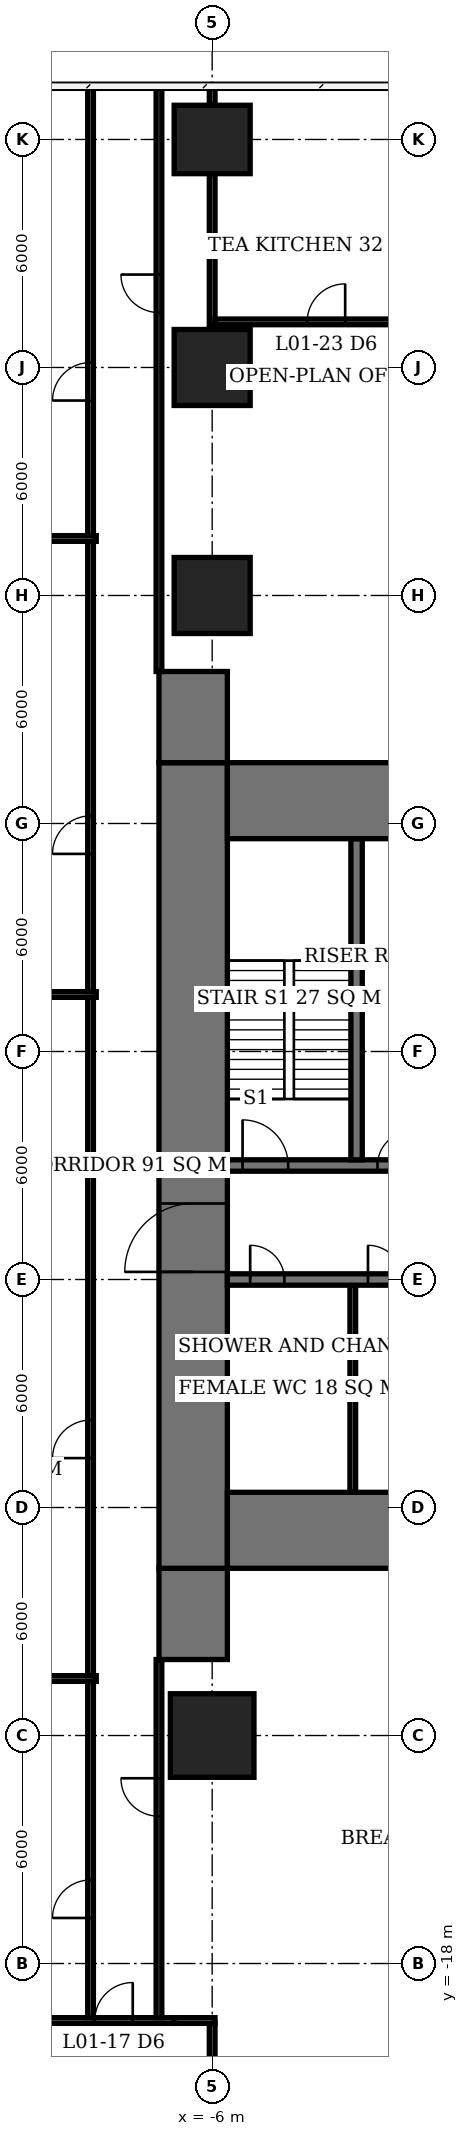
"""IFC4 building model, lengths in metres.
Left out: names, types, materials, properties, quantities, classifications, styles, units other than length and angle.
Written with IfcOpenShell. Run it as: python <this file> out.ifc"""

import sys

from ifc_helpers import new_model, si_unit, direction, frame, frame_2d, origin, origin_2d, place, context, subcontext, project, spatial, rectangle, extrude, element, fill, save


model = new_model("IFC4")
c1 = context("Model", 3, precision=1e-05, world=origin(), true_north=direction((0.0, 1.0)))
c2 = subcontext(c1, "Body", "Model", "MODEL_VIEW")
j1 = project(units=[si_unit("LENGTHUNIT", "METRE"), si_unit("PLANEANGLEUNIT", "RADIAN")], contexts=[c1])
p1 = place(None, origin())
s1 = spatial("IfcSite", under=j1, at=p1, CompositionType="ELEMENT")
p2 = place(p1, origin())
s2 = spatial("IfcBuilding", under=s1, at=p2, CompositionType="ELEMENT")
p3 = place(p2, frame((0.0, 0.0, 6.0)))
s3 = spatial("IfcBuildingStorey", under=s2, at=p3, CompositionType="ELEMENT", Elevation=6.0)
p4 = place(p3, frame((-6.0, -12.0, 0.0), z_axis=(0.0, 0.0, 1.0), x_axis=(1.0, 0.0, 0.0)))
e1 = element("IfcColumn", 1, at=p4, inside=s3, PredefinedType="COLUMN", context=c2, shape_type="SweptSolid", body=[
    extrude(rectangle(XDim=2.2, YDim=2.2, at=origin_2d()), origin(), (0.0, 0.0, 1.0), 5.0),
])
for number, where, z_axis, x_axis in (
    (2, (-6.0, 18.0, 0.0), (0.0, 0.0, 1.0), (1.0, 0.0, 0.0)),
    (3, (-6.0, 24.0, 0.0), (0.0, 0.0, 1.0), (1.0, 0.0, 0.0)),
):
    element("IfcColumn", number, at=place(p3, frame(where, z_axis=z_axis, x_axis=x_axis)), inside=s3, PredefinedType="COLUMN", context=c2, shape_type="SweptSolid", body=[
        extrude(rectangle(XDim=2.0, YDim=2.0, at=origin_2d()), origin(), (0.0, 0.0, 1.0), 5.0),
    ])
p5 = place(p3, frame((-6.0, 30.0, 0.0), z_axis=(0.0, 0.0, 1.0), x_axis=(1.0, 0.0, 0.0)))
e4 = element("IfcColumn", 4, at=p5, inside=s3, PredefinedType="COLUMN", context=c2, shape_type="SweptSolid", body=[
    extrude(rectangle(XDim=2.0, YDim=1.8, at=origin_2d()), origin(), (0.0, 0.0, 1.0), 5.0),
])
for number, where, z_axis, x_axis in (
    (5, (-5.6, -6.6, 0.0), (0.0, 0.0, 1.0), (1.0, 0.0, 0.0)),
    (6, (-5.6, 12.6, 0.0), (0.0, 0.0, 1.0), (1.0, 0.0, 0.0)),
):
    element("IfcWall", number, at=place(p3, frame(where, z_axis=z_axis, x_axis=x_axis)), inside=s3, PredefinedType="SHEAR", context=c2, shape_type="SweptSolid", body=[
        extrude(rectangle(XDim=23.2, YDim=2.0, at=frame_2d((11.6, 0.0))), origin(), (0.0, 0.0, 1.0), 5.0),
    ])
p6 = place(p3, frame((-6.5, -7.6, 0.0), z_axis=(0.0, 0.0, 1.0), x_axis=(0.0, 1.0, 0.0)))
e7 = element("IfcWall", 7, at=p6, inside=s3, PredefinedType="SHEAR", context=c2, shape_type="SweptSolid", body=[
    extrude(rectangle(XDim=21.2, YDim=1.8, at=frame_2d((10.6, 0.0))), origin(), (0.0, 0.0, 1.0), 5.0),
])
p7 = place(p6, frame((7.8, 0.0, 0.0)))
e8 = element("IfcOpeningElement", 8, at=p7, cuts=e7, PredefinedType="OPENING", context=c2, shape_type="SweptSolid", body=[
    extrude(rectangle(XDim=1.8, YDim=2.4, at=frame_2d((0.9, 1.2))), frame((0.0, 0.91, 0.0), z_axis=(0.0, -1.0, 0.0), x_axis=(1.0, 0.0, 0.0)), (0.0, 0.0, 1.0), 1.82),
])
for number, where, z_axis, x_axis in (
    (9, (-6.5, -10.0, 0.0), (0.0, 0.0, 1.0), (0.0, 1.0, 0.0)),
    (10, (-6.5, 13.6, 0.0), (0.0, 0.0, 1.0), (0.0, 1.0, 0.0)),
):
    element("IfcWall", number, at=place(p3, frame(where, z_axis=z_axis, x_axis=x_axis)), inside=s3, PredefinedType="SHEAR", context=c2, shape_type="SweptSolid", body=[
        extrude(rectangle(XDim=2.4, YDim=1.8, at=frame_2d((1.2, 0.0))), origin(), (0.0, 0.0, 1.0), 5.0),
    ])
p8 = place(p3, frame((-5.6, 0.0, 0.0), z_axis=(0.0, 0.0, 1.0), x_axis=(1.0, 0.0, 0.0)))
e11 = element("IfcWall", 11, at=p8, inside=s3, PredefinedType="SHEAR", context=c2, shape_type="SweptSolid", body=[
    extrude(rectangle(XDim=17.75, YDim=0.3, at=frame_2d((8.875, 0.0))), origin(), (0.0, 0.0, 1.0), 5.0),
])
p9 = place(p8, frame((0.6, 0.0, 0.0)))
e12 = element("IfcOpeningElement", 12, at=p9, cuts=e11, PredefinedType="OPENING", context=c2, shape_type="SweptSolid", body=[
    extrude(rectangle(XDim=0.9, YDim=2.1, at=frame_2d((0.45, 1.05))), frame((0.0, 0.16, 0.0), z_axis=(0.0, -1.0, 0.0), x_axis=(1.0, 0.0, 0.0)), (0.0, 0.0, 1.0), 0.32),
])
p10 = place(p8, frame((3.7, 0.0, 0.0)))
e13 = element("IfcOpeningElement", 13, at=p10, cuts=e11, PredefinedType="OPENING", context=c2, shape_type="SweptSolid", body=[
    extrude(rectangle(XDim=0.9, YDim=2.1, at=frame_2d((0.45, 1.05))), frame((0.0, 0.16, 0.0), z_axis=(0.0, -1.0, 0.0), x_axis=(1.0, 0.0, 0.0)), (0.0, 0.0, 1.0), 0.32),
])
p11 = place(p3, frame((-5.6, 3.0, 0.0), z_axis=(0.0, 0.0, 1.0), x_axis=(1.0, 0.0, 0.0)))
e14 = element("IfcWall", 14, at=p11, inside=s3, PredefinedType="SHEAR", context=c2, shape_type="SweptSolid", body=[
    extrude(rectangle(XDim=5.45, YDim=0.3, at=frame_2d((2.725, 0.0))), origin(), (0.0, 0.0, 1.0), 5.0),
])
p12 = place(p11, frame((0.4, 0.0, 0.0)))
e15 = element("IfcOpeningElement", 15, at=p12, cuts=e14, PredefinedType="OPENING", context=c2, shape_type="SweptSolid", body=[
    extrude(rectangle(XDim=1.2, YDim=2.1, at=frame_2d((0.6, 1.05))), frame((0.0, 0.16, 0.0), z_axis=(0.0, -1.0, 0.0), x_axis=(1.0, 0.0, 0.0)), (0.0, 0.0, 1.0), 0.32),
])
p13 = place(p11, frame((3.95, 0.0, 0.0)))
e16 = element("IfcOpeningElement", 16, at=p13, cuts=e14, PredefinedType="OPENING", context=c2, shape_type="SweptSolid", body=[
    extrude(rectangle(XDim=0.9, YDim=2.1, at=frame_2d((0.45, 1.05))), frame((0.0, 0.16, 0.0), z_axis=(0.0, -1.0, 0.0), x_axis=(1.0, 0.0, 0.0)), (0.0, 0.0, 1.0), 0.32),
])
p14 = place(p3, frame((-2.2, 3.15, 0.0), z_axis=(0.0, 0.0, 1.0), x_axis=(0.0, 1.0, 0.0)))
e17 = element("IfcWall", 17, at=p14, inside=s3, PredefinedType="SHEAR", context=c2, shape_type="SweptSolid", body=[
    extrude(rectangle(XDim=8.45, YDim=0.3, at=frame_2d((4.225, 0.0))), origin(), (0.0, 0.0, 1.0), 5.0),
])
p15 = place(p3, frame((-2.3, -5.6, 0.0), z_axis=(0.0, 0.0, 1.0), x_axis=(0.0, 1.0, 0.0)))
e18 = element("IfcWall", 18, at=p15, inside=s3, PredefinedType="PLUMBINGWALL", context=c2, shape_type="SweptSolid", body=[
    extrude(rectangle(XDim=5.45, YDim=0.15, at=frame_2d((2.725, 0.0))), origin(), (0.0, 0.0, 1.0), 4.75),
])
p16 = place(p3, frame((-10.99, -19.5, 0.0), z_axis=(0.0, 0.0, 1.0), x_axis=(1.0, 0.0, 0.0)))
e19 = element("IfcWall", 19, at=p16, inside=s3, PredefinedType="PARTITIONING", context=c2, shape_type="SweptSolid", body=[
    extrude(rectangle(XDim=3.98, YDim=0.15, at=frame_2d((1.99, 0.0))), origin(), (0.0, 0.0, 1.0), 4.75),
])
p17 = place(p16, frame((1.9, 0.0, 0.0)))
e20 = element("IfcOpeningElement", 20, at=p17, cuts=e19, PredefinedType="OPENING", context=c2, shape_type="SweptSolid", body=[
    extrude(rectangle(XDim=1.0, YDim=2.1, at=frame_2d((0.5, 1.05))), frame((0.0, 0.085, 0.0), z_axis=(0.0, -1.0, 0.0), x_axis=(1.0, 0.0, 0.0)), (0.0, 0.0, 1.0), 0.17),
])
p18 = place(p3, frame((-7.01, -19.5, 0.0), z_axis=(0.0, 0.0, 1.0), x_axis=(1.0, 0.0, 0.0)))
e21 = element("IfcWall", 21, at=p18, inside=s3, PredefinedType="PARTITIONING", context=c2, shape_type="SweptSolid", body=[
    extrude(rectangle(XDim=1.085, YDim=0.15, at=frame_2d((0.542, 0.0))), origin(), (0.0, 0.0, 1.0), 3.75),
])
p19 = place(p3, frame((-5.925, 25.2, 0.0), z_axis=(0.0, 0.0, 1.0), x_axis=(1.0, 0.0, 0.0)))
e22 = element("IfcWall", 22, at=p19, inside=s3, PredefinedType="PARTITIONING", context=c2, shape_type="SweptSolid", body=[
    extrude(rectangle(XDim=5.85, YDim=0.15, at=frame_2d((2.925, 0.0))), origin(), (0.0, 0.0, 1.0), 4.75),
])
p20 = place(p19, frame((2.425, 0.0, 0.0)))
e23 = element("IfcOpeningElement", 23, at=p20, cuts=e22, PredefinedType="OPENING", context=c2, shape_type="SweptSolid", body=[
    extrude(rectangle(XDim=1.0, YDim=2.1, at=frame_2d((0.5, 1.05))), frame((0.0, 0.085, 0.0), z_axis=(0.0, -1.0, 0.0), x_axis=(1.0, 0.0, 0.0)), (0.0, 0.0, 1.0), 0.17),
])
p21 = place(p3, frame((-6.0, -23.1, 0.0), z_axis=(0.0, 0.0, 1.0), x_axis=(0.0, 1.0, 0.0)))
e24 = element("IfcWall", 24, at=p21, inside=s3, PredefinedType="PARTITIONING", context=c2, shape_type="SweptSolid", body=[
    extrude(rectangle(XDim=3.525, YDim=0.15, at=frame_2d((1.763, 0.0))), origin(), (0.0, 0.0, 1.0), 3.75),
])
p22 = place(p3, frame((-6.0, 25.125, 0.0), z_axis=(0.0, 0.0, 1.0), x_axis=(0.0, 1.0, 0.0)))
e25 = element("IfcWall", 25, at=p22, inside=s3, PredefinedType="PARTITIONING", context=c2, shape_type="SweptSolid", body=[
    extrude(rectangle(XDim=3.975, YDim=0.15, at=frame_2d((1.988, 0.0))), origin(), (0.0, 0.0, 1.0), 4.75),
])
p23 = place(p3, frame((-6.0, 30.9, 0.0), z_axis=(0.0, 0.0, 1.0), x_axis=(0.0, 1.0, 0.0)))
e26 = element("IfcWall", 26, at=p23, inside=s3, PredefinedType="PARTITIONING", context=c2, shape_type="SweptSolid", body=[
    extrude(rectangle(XDim=0.475, YDim=0.15, at=frame_2d((0.238, 0.0))), origin(), (0.0, 0.0, 1.0), 4.75),
])
for number, where, z_axis, x_axis in (
    (27, (-31.375, 7.5, 0.0), (0.0, 0.0, 1.0), (1.0, 0.0, 0.0)),
    (28, (-31.375, 19.5, 0.0), (0.0, 0.0, 1.0), (1.0, 0.0, 0.0)),
):
    element("IfcWall", number, at=place(p3, frame(where, z_axis=z_axis, x_axis=x_axis)), inside=s3, PredefinedType="PARTITIONING", context=c2, shape_type="SweptSolid", body=[
        extrude(rectangle(XDim=22.325, YDim=0.15, at=frame_2d((11.163, 0.0))), origin(), (0.0, 0.0, 1.0), 4.75),
    ])
p24 = place(p3, frame((-19.075, -10.5, 0.0), z_axis=(0.0, 0.0, 1.0), x_axis=(1.0, 0.0, 0.0)))
e29 = element("IfcWall", 29, at=p24, inside=s3, PredefinedType="PARTITIONING", context=c2, shape_type="SweptSolid", body=[
    extrude(rectangle(XDim=10.025, YDim=0.15, at=frame_2d((5.012, 0.0))), origin(), (0.0, 0.0, 1.0), 4.75),
])
p25 = place(p3, frame((-9.2, -19.425, 0.0), z_axis=(0.0, 0.0, 1.0), x_axis=(0.0, 1.0, 0.0)))
e30 = element("IfcWall", 30, at=p25, inside=s3, PredefinedType="PARTITIONING", context=c2, shape_type="SweptSolid", body=[
    extrude(rectangle(XDim=8.85, YDim=0.15, at=frame_2d((4.425, 0.0))), origin(), (0.0, 0.0, 1.0), 4.75),
])
p26 = place(p25, frame((2.624, 0.0, 0.0)))
e31 = element("IfcOpeningElement", 31, at=p26, cuts=e30, PredefinedType="OPENING", context=c2, shape_type="SweptSolid", body=[
    extrude(rectangle(XDim=1.0, YDim=2.1, at=frame_2d((0.5, 1.05))), frame((0.0, 0.085, 0.0), z_axis=(0.0, -1.0, 0.0), x_axis=(1.0, 0.0, 0.0)), (0.0, 0.0, 1.0), 0.17),
])
p27 = place(p3, frame((-9.2, -10.425, 0.0), z_axis=(0.0, 0.0, 1.0), x_axis=(0.0, 1.0, 0.0)))
e32 = element("IfcWall", 32, at=p27, inside=s3, PredefinedType="PARTITIONING", context=c2, shape_type="SweptSolid", body=[
    extrude(rectangle(XDim=17.85, YDim=0.15, at=frame_2d((8.925, 0.0))), origin(), (0.0, 0.0, 1.0), 4.75),
])
p28 = place(p27, frame((5.725, 0.0, 0.0)))
e33 = element("IfcOpeningElement", 33, at=p28, cuts=e32, PredefinedType="OPENING", context=c2, shape_type="SweptSolid", body=[
    extrude(rectangle(XDim=1.0, YDim=2.1, at=frame_2d((0.5, 1.05))), frame((0.0, 0.085, 0.0), z_axis=(0.0, -1.0, 0.0), x_axis=(1.0, 0.0, 0.0)), (0.0, 0.0, 1.0), 0.17),
])
p29 = place(p3, frame((-9.2, 7.575, 0.0), z_axis=(0.0, 0.0, 1.0), x_axis=(0.0, 1.0, 0.0)))
e34 = element("IfcWall", 34, at=p29, inside=s3, PredefinedType="PARTITIONING", context=c2, shape_type="SweptSolid", body=[
    extrude(rectangle(XDim=11.85, YDim=0.15, at=frame_2d((5.925, 0.0))), origin(), (0.0, 0.0, 1.0), 4.75),
])
p30 = place(p29, frame((3.625, 0.0, 0.0)))
e35 = element("IfcOpeningElement", 35, at=p30, cuts=e34, PredefinedType="OPENING", context=c2, shape_type="SweptSolid", body=[
    extrude(rectangle(XDim=1.0, YDim=2.1, at=frame_2d((0.5, 1.05))), frame((0.0, 0.085, 0.0), z_axis=(0.0, -1.0, 0.0), x_axis=(1.0, 0.0, 0.0)), (0.0, 0.0, 1.0), 0.17),
])
p31 = place(p3, frame((-9.2, 19.575, 0.0), z_axis=(0.0, 0.0, 1.0), x_axis=(0.0, 1.0, 0.0)))
e36 = element("IfcWall", 36, at=p31, inside=s3, PredefinedType="PARTITIONING", context=c2, shape_type="SweptSolid", body=[
    extrude(rectangle(XDim=11.775, YDim=0.15, at=frame_2d((5.888, 0.0))), origin(), (0.0, 0.0, 1.0), 4.75),
])
p32 = place(p31, frame((3.555, 0.0, 0.0)))
e37 = element("IfcOpeningElement", 37, at=p32, cuts=e36, PredefinedType="OPENING", context=c2, shape_type="SweptSolid", body=[
    extrude(rectangle(XDim=1.0, YDim=2.1, at=frame_2d((0.5, 1.05))), frame((0.0, 0.085, 0.0), z_axis=(0.0, -1.0, 0.0), x_axis=(1.0, 0.0, 0.0)), (0.0, 0.0, 1.0), 0.17),
])
p33 = place(p3, frame((-7.4, -19.425, 0.0), z_axis=(0.0, 0.0, 1.0), x_axis=(0.0, 1.0, 0.0)))
e38 = element("IfcWall", 38, at=p33, inside=s3, PredefinedType="PARTITIONING", context=c2, shape_type="SweptSolid", body=[
    extrude(rectangle(XDim=9.425, YDim=0.15, at=frame_2d((4.712, 0.0))), origin(), (0.0, 0.0, 1.0), 4.75),
])
p34 = place(p33, frame((5.3, 0.0, 0.0)))
e39 = element("IfcOpeningElement", 39, at=p34, cuts=e38, PredefinedType="OPENING", context=c2, shape_type="SweptSolid", body=[
    extrude(rectangle(XDim=1.0, YDim=2.1, at=frame_2d((0.5, 1.05))), frame((0.0, 0.085, 0.0), z_axis=(0.0, -1.0, 0.0), x_axis=(1.0, 0.0, 0.0)), (0.0, 0.0, 1.0), 0.17),
])
p35 = place(p3, frame((-7.4, 16.0, 0.0), z_axis=(0.0, 0.0, 1.0), x_axis=(0.0, 1.0, 0.0)))
e40 = element("IfcWall", 40, at=p35, inside=s3, PredefinedType="PARTITIONING", context=c2, shape_type="SweptSolid", body=[
    extrude(rectangle(XDim=15.375, YDim=0.15, at=frame_2d((7.688, 0.0))), origin(), (0.0, 0.0, 1.0), 4.75),
])
p36 = place(p35, frame((9.445, 0.0, 0.0)))
e41 = element("IfcOpeningElement", 41, at=p36, cuts=e40, PredefinedType="OPENING", context=c2, shape_type="SweptSolid", body=[
    extrude(rectangle(XDim=1.0, YDim=2.1, at=frame_2d((0.5, 1.05))), frame((0.0, 0.085, 0.0), z_axis=(0.0, -1.0, 0.0), x_axis=(1.0, 0.0, 0.0)), (0.0, 0.0, 1.0), 0.17),
])
p37 = place(p7, origin())
e42 = element("IfcDoor", 42, at=p37, inside=s3, OperationType="DOUBLE_DOOR_SINGLE_SWING", PredefinedType="DOOR", context=c2, shape_type="SweptSolid", body=[
    extrude(rectangle(XDim=1.8, YDim=2.4, at=frame_2d((0.9, 1.2))), frame((0.0, 0.025, 0.0), z_axis=(0.0, -1.0, 0.0), x_axis=(1.0, 0.0, 0.0)), (0.0, 0.0, 1.0), 0.05),
])
fill(e8, e42)
p38 = place(p12, origin())
e43 = element("IfcDoor", 43, at=p38, inside=s3, OperationType="SINGLE_SWING_LEFT", PredefinedType="DOOR", context=c2, shape_type="SweptSolid", body=[
    extrude(rectangle(XDim=1.2, YDim=2.1, at=frame_2d((0.6, 1.05))), frame((0.0, 0.025, 0.0), z_axis=(0.0, -1.0, 0.0), x_axis=(1.0, 0.0, 0.0)), (0.0, 0.0, 1.0), 0.05),
])
fill(e15, e43)
p39 = place(p13, origin())
e44 = element("IfcDoor", 44, at=p39, inside=s3, OperationType="SINGLE_SWING_RIGHT", PredefinedType="DOOR", context=c2, shape_type="SweptSolid", body=[
    extrude(rectangle(XDim=0.9, YDim=2.1, at=frame_2d((0.45, 1.05))), frame((0.0, 0.025, 0.0), z_axis=(0.0, -1.0, 0.0), x_axis=(1.0, 0.0, 0.0)), (0.0, 0.0, 1.0), 0.05),
])
fill(e16, e44)
p40 = place(p9, origin())
e45 = element("IfcDoor", 45, at=p40, inside=s3, OperationType="SINGLE_SWING_LEFT", PredefinedType="DOOR", context=c2, shape_type="SweptSolid", body=[
    extrude(rectangle(XDim=0.9, YDim=2.1, at=frame_2d((0.45, 1.05))), frame((0.0, 0.025, 0.0), z_axis=(0.0, -1.0, 0.0), x_axis=(1.0, 0.0, 0.0)), (0.0, 0.0, 1.0), 0.05),
])
fill(e12, e45)
p41 = place(p10, origin())
e46 = element("IfcDoor", 46, at=p41, inside=s3, OperationType="SINGLE_SWING_LEFT", PredefinedType="DOOR", context=c2, shape_type="SweptSolid", body=[
    extrude(rectangle(XDim=0.9, YDim=2.1, at=frame_2d((0.45, 1.05))), frame((0.0, 0.025, 0.0), z_axis=(0.0, -1.0, 0.0), x_axis=(1.0, 0.0, 0.0)), (0.0, 0.0, 1.0), 0.05),
])
fill(e13, e46)
p42 = place(p17, origin())
e47 = element("IfcDoor", 47, at=p42, inside=s3, OperationType="SINGLE_SWING_RIGHT", PredefinedType="DOOR", context=c2, shape_type="SweptSolid", body=[
    extrude(rectangle(XDim=1.0, YDim=2.1, at=frame_2d((0.5, 1.05))), frame((0.0, 0.025, 0.0), z_axis=(0.0, -1.0, 0.0), x_axis=(1.0, 0.0, 0.0)), (0.0, 0.0, 1.0), 0.05),
])
fill(e20, e47)
p43 = place(p20, origin())
e48 = element("IfcDoor", 48, at=p43, inside=s3, OperationType="SINGLE_SWING_RIGHT", PredefinedType="DOOR", context=c2, shape_type="SweptSolid", body=[
    extrude(rectangle(XDim=1.0, YDim=2.1, at=frame_2d((0.5, 1.05))), frame((0.0, 0.025, 0.0), z_axis=(0.0, -1.0, 0.0), x_axis=(1.0, 0.0, 0.0)), (0.0, 0.0, 1.0), 0.05),
])
fill(e23, e48)
p44 = place(p26, origin())
e49 = element("IfcDoor", 49, at=p44, inside=s3, OperationType="SINGLE_SWING_LEFT", PredefinedType="DOOR", context=c2, shape_type="SweptSolid", body=[
    extrude(rectangle(XDim=1.0, YDim=2.1, at=frame_2d((0.5, 1.05))), frame((0.0, 0.025, 0.0), z_axis=(0.0, -1.0, 0.0), x_axis=(1.0, 0.0, 0.0)), (0.0, 0.0, 1.0), 0.05),
])
fill(e31, e49)
p45 = place(p28, origin())
e50 = element("IfcDoor", 50, at=p45, inside=s3, OperationType="SINGLE_SWING_LEFT", PredefinedType="DOOR", context=c2, shape_type="SweptSolid", body=[
    extrude(rectangle(XDim=1.0, YDim=2.1, at=frame_2d((0.5, 1.05))), frame((0.0, 0.025, 0.0), z_axis=(0.0, -1.0, 0.0), x_axis=(1.0, 0.0, 0.0)), (0.0, 0.0, 1.0), 0.05),
])
fill(e33, e50)
p46 = place(p30, origin())
e51 = element("IfcDoor", 51, at=p46, inside=s3, OperationType="SINGLE_SWING_LEFT", PredefinedType="DOOR", context=c2, shape_type="SweptSolid", body=[
    extrude(rectangle(XDim=1.0, YDim=2.1, at=frame_2d((0.5, 1.05))), frame((0.0, 0.025, 0.0), z_axis=(0.0, -1.0, 0.0), x_axis=(1.0, 0.0, 0.0)), (0.0, 0.0, 1.0), 0.05),
])
fill(e35, e51)
p47 = place(p36, origin())
e52 = element("IfcDoor", 52, at=p47, inside=s3, OperationType="SINGLE_SWING_RIGHT", PredefinedType="DOOR", context=c2, shape_type="SweptSolid", body=[
    extrude(rectangle(XDim=1.0, YDim=2.1, at=frame_2d((0.5, 1.05))), frame((0.0, 0.025, 0.0), z_axis=(0.0, -1.0, 0.0), x_axis=(1.0, 0.0, 0.0)), (0.0, 0.0, 1.0), 0.05),
])
fill(e41, e52)
p48 = place(p32, origin())
e53 = element("IfcDoor", 53, at=p48, inside=s3, OperationType="SINGLE_SWING_LEFT", PredefinedType="DOOR", context=c2, shape_type="SweptSolid", body=[
    extrude(rectangle(XDim=1.0, YDim=2.1, at=frame_2d((0.5, 1.05))), frame((0.0, 0.025, 0.0), z_axis=(0.0, -1.0, 0.0), x_axis=(1.0, 0.0, 0.0)), (0.0, 0.0, 1.0), 0.05),
])
fill(e37, e53)
p49 = place(p34, origin())
e54 = element("IfcDoor", 54, at=p49, inside=s3, OperationType="SINGLE_SWING_RIGHT", PredefinedType="DOOR", context=c2, shape_type="SweptSolid", body=[
    extrude(rectangle(XDim=1.0, YDim=2.1, at=frame_2d((0.5, 1.05))), frame((0.0, 0.025, 0.0), z_axis=(0.0, -1.0, 0.0), x_axis=(1.0, 0.0, 0.0)), (0.0, 0.0, 1.0), 0.05),
])
fill(e39, e54)
save(model, sys.argv[1])
